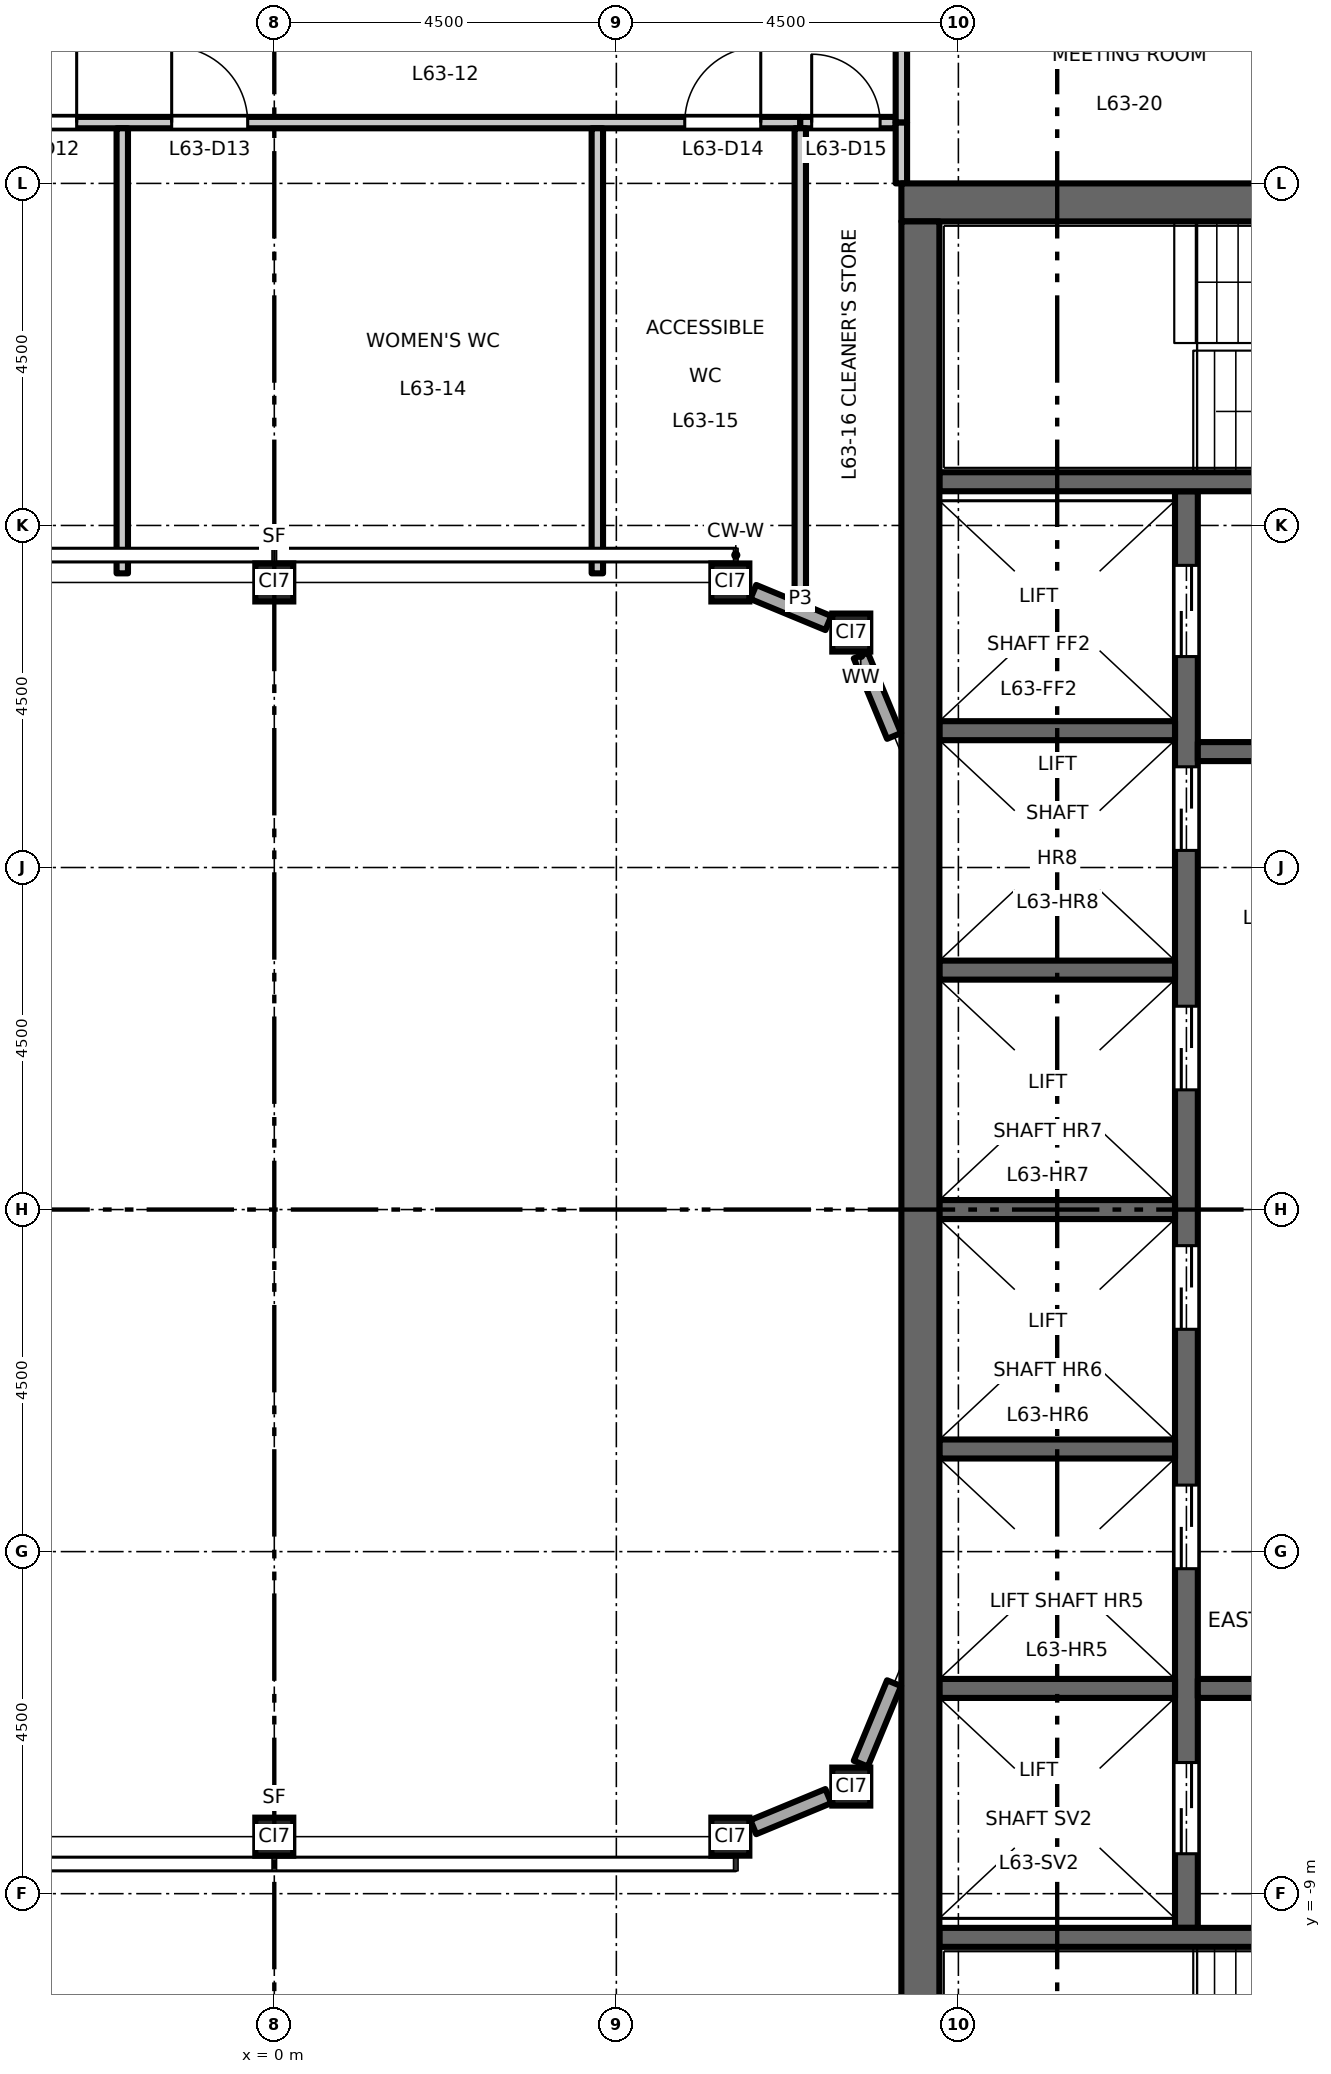
"""IFC4 building model, lengths in metres.
Left out: names, types, materials, properties, quantities, classifications, styles, units other than length and angle.
Written with IfcOpenShell. Run it as: python <this file> out.ifc"""

import sys

from ifc_helpers import new_model, si_unit, direction, frame, frame_2d, origin, origin_2d, place, context, subcontext, project, spatial, rectangle, hollow_rectangle, extrude, element, fill, save


model = new_model("IFC4")
c1 = context("Model", 3, precision=1e-05, world=origin(), true_north=direction((0.0, 1.0)))
c2 = subcontext(c1, "Body", "Model", "MODEL_VIEW")
j1 = project(units=[si_unit("LENGTHUNIT", "METRE"), si_unit("PLANEANGLEUNIT", "RADIAN")], contexts=[c1])
p1 = place(None, origin())
s1 = spatial("IfcSite", under=j1, at=p1, CompositionType="ELEMENT")
p2 = place(p1, origin())
s2 = spatial("IfcBuilding", under=s1, at=p2, CompositionType="ELEMENT")
p3 = place(p2, frame((0.0, 0.0, 294.2)))
s3 = spatial("IfcBuildingStorey", under=s2, at=p3, CompositionType="ELEMENT", Elevation=294.2)
for number, where, z_axis, x_axis in (
    (1, (0.0, -8.25, 0.0), (0.0, 0.0, 1.0), (1.0, 0.0, 0.0)),
    (2, (6.0, -8.25, 0.0), (0.0, 0.0, 1.0), (1.0, 0.0, 0.0)),
    (3, (7.591, -7.591, 0.0), (0.0, 0.0, 1.0), (1.0, 0.0, 0.0)),
    (4, (0.0, 8.25, 0.0), (0.0, 0.0, 1.0), (1.0, 0.0, 0.0)),
    (5, (6.0, 8.25, 0.0), (0.0, 0.0, 1.0), (1.0, 0.0, 0.0)),
    (6, (7.591, 7.591, 0.0), (0.0, 0.0, 1.0), (1.0, 0.0, 0.0)),
):
    element("IfcColumn", number, at=place(p3, frame(where, z_axis=z_axis, x_axis=x_axis)), inside=s3, PredefinedType="COLUMN", context=c2, shape_type="SweptSolid", body=[
        extrude(hollow_rectangle(XDim=0.5, YDim=0.5, WallThickness=0.025, at=origin_2d()), origin(), (0.0, 0.0, 1.0), 4.5),
    ])
p4 = place(p3, frame((12.0, -9.45, 0.0), z_axis=(0.0, 0.0, 1.0), x_axis=(0.0, 1.0, 0.0)))
e7 = element("IfcWall", 7, at=p4, inside=s3, PredefinedType="SHEAR", context=c2, shape_type="SweptSolid", body=[
    extrude(rectangle(XDim=18.9, YDim=0.3, at=frame_2d((9.45, 0.0))), origin(), (0.0, 0.0, 1.0), 4.35),
])
p5 = place(p4, frame((4.725, 0.0, 0.0)))
e8 = element("IfcOpeningElement", 8, at=p5, cuts=e7, PredefinedType="OPENING", context=c2, shape_type="SweptSolid", body=[
    extrude(rectangle(XDim=1.1, YDim=2.1, at=frame_2d((0.55, 1.05))), frame((0.0, 0.16, 0.0), z_axis=(0.0, -1.0, 0.0), x_axis=(1.0, 0.0, 0.0)), (0.0, 0.0, 1.0), 0.32),
])
p6 = place(p4, frame((7.875, 0.0, 0.0)))
e9 = element("IfcOpeningElement", 9, at=p6, cuts=e7, PredefinedType="OPENING", context=c2, shape_type="SweptSolid", body=[
    extrude(rectangle(XDim=1.1, YDim=2.1, at=frame_2d((0.55, 1.05))), frame((0.0, 0.16, 0.0), z_axis=(0.0, -1.0, 0.0), x_axis=(1.0, 0.0, 0.0)), (0.0, 0.0, 1.0), 0.32),
])
p7 = place(p4, frame((11.025, 0.0, 0.0)))
e10 = element("IfcOpeningElement", 10, at=p7, cuts=e7, PredefinedType="OPENING", context=c2, shape_type="SweptSolid", body=[
    extrude(rectangle(XDim=1.1, YDim=2.1, at=frame_2d((0.55, 1.05))), frame((0.0, 0.16, 0.0), z_axis=(0.0, -1.0, 0.0), x_axis=(1.0, 0.0, 0.0)), (0.0, 0.0, 1.0), 0.32),
])
p8 = place(p4, frame((14.175, 0.0, 0.0)))
e11 = element("IfcOpeningElement", 11, at=p8, cuts=e7, PredefinedType="OPENING", context=c2, shape_type="SweptSolid", body=[
    extrude(rectangle(XDim=1.1, YDim=2.1, at=frame_2d((0.55, 1.05))), frame((0.0, 0.16, 0.0), z_axis=(0.0, -1.0, 0.0), x_axis=(1.0, 0.0, 0.0)), (0.0, 0.0, 1.0), 0.32),
])
p9 = place(p4, frame((16.725, 0.0, 0.0)))
e12 = element("IfcOpeningElement", 12, at=p9, cuts=e7, PredefinedType="OPENING", context=c2, shape_type="SweptSolid", body=[
    extrude(rectangle(XDim=1.2, YDim=2.1, at=frame_2d((0.6, 1.05))), frame((0.0, 0.16, 0.0), z_axis=(0.0, -1.0, 0.0), x_axis=(1.0, 0.0, 0.0)), (0.0, 0.0, 1.0), 0.32),
])
p10 = place(p4, frame((0.975, 0.0, 0.0)))
e13 = element("IfcOpeningElement", 13, at=p10, cuts=e7, PredefinedType="OPENING", context=c2, shape_type="SweptSolid", body=[
    extrude(rectangle(XDim=1.2, YDim=2.1, at=frame_2d((0.6, 1.05))), frame((0.0, 0.16, 0.0), z_axis=(0.0, -1.0, 0.0), x_axis=(1.0, 0.0, 0.0)), (0.0, 0.0, 1.0), 0.32),
])
p11 = place(p3, frame((12.15, 6.025, 0.0), z_axis=(0.0, 0.0, 1.0), x_axis=(1.0, 0.0, 0.0)))
e14 = element("IfcWall", 14, at=p11, inside=s3, PredefinedType="SHEAR", context=c2, shape_type="SweptSolid", body=[
    extrude(rectangle(XDim=4.6, YDim=0.25, at=frame_2d((2.3, 0.0))), origin(), (0.0, 0.0, 1.0), 4.35),
])
p12 = place(p11, frame((1.8, 0.0, 0.0)))
e15 = element("IfcOpeningElement", 15, at=p12, cuts=e14, PredefinedType="OPENING", context=c2, shape_type="SweptSolid", body=[
    extrude(rectangle(XDim=1.0, YDim=2.1, at=frame_2d((0.5, 1.05))), frame((0.0, 0.135, 0.0), z_axis=(0.0, -1.0, 0.0), x_axis=(1.0, 0.0, 0.0)), (0.0, 0.0, 1.0), 0.27),
])
p13 = place(p3, frame((12.15, -6.3, 0.0), z_axis=(0.0, 0.0, 1.0), x_axis=(1.0, 0.0, 0.0)))
e16 = element("IfcWall", 16, at=p13, inside=s3, PredefinedType="SHEAR", context=c2, shape_type="SweptSolid", body=[
    extrude(rectangle(XDim=4.6, YDim=0.25, at=frame_2d((2.3, 0.0))), origin(), (0.0, 0.0, 1.0), 4.35),
])
p14 = place(p13, frame((1.8, 0.0, 0.0)))
e17 = element("IfcOpeningElement", 17, at=p14, cuts=e16, PredefinedType="OPENING", context=c2, shape_type="SweptSolid", body=[
    extrude(rectangle(XDim=1.0, YDim=2.1, at=frame_2d((0.5, 1.05))), frame((0.0, 0.135, 0.0), z_axis=(0.0, -1.0, 0.0), x_axis=(1.0, 0.0, 0.0)), (0.0, 0.0, 1.0), 0.27),
])
for number, where, z_axis, x_axis in (
    (18, (8.75, 0.0, 0.0), (0.0, 0.0, 1.0), (1.0, 0.0, 0.0)),
    (19, (8.75, 3.15, 0.0), (0.0, 0.0, 1.0), (1.0, 0.0, 0.0)),
    (20, (8.75, 6.3, 0.0), (0.0, 0.0, 1.0), (1.0, 0.0, 0.0)),
    (21, (8.75, -3.15, 0.0), (0.0, 0.0, 1.0), (1.0, 0.0, 0.0)),
    (22, (8.75, -6.3, 0.0), (0.0, 0.0, 1.0), (1.0, 0.0, 0.0)),
):
    element("IfcWall", number, at=place(p3, frame(where, z_axis=z_axis, x_axis=x_axis)), inside=s3, PredefinedType="SHEAR", context=c2, shape_type="SweptSolid", body=[
        extrude(rectangle(XDim=3.1, YDim=0.25, at=frame_2d((1.55, 0.0))), origin(), (0.0, 0.0, 1.0), 4.35),
    ])
p15 = place(p3, frame((8.75, 9.575, 0.0), z_axis=(0.0, 0.0, 1.0), x_axis=(1.0, 0.0, 0.0)))
e23 = element("IfcWall", 23, at=p15, inside=s3, PredefinedType="SHEAR", context=c2, shape_type="SweptSolid", body=[
    extrude(rectangle(XDim=8.0, YDim=0.25, at=frame_2d((4.0, 0.0))), origin(), (0.0, 0.0, 1.0), 4.35),
])
p16 = place(p15, frame((6.65, 0.0, 0.0)))
e24 = element("IfcOpeningElement", 24, at=p16, cuts=e23, PredefinedType="OPENING", context=c2, shape_type="SweptSolid", body=[
    extrude(rectangle(XDim=1.1, YDim=2.1, at=frame_2d((0.55, 1.05))), frame((0.0, 0.135, 0.0), z_axis=(0.0, -1.0, 0.0), x_axis=(1.0, 0.0, 0.0)), (0.0, 0.0, 1.0), 0.27),
])
p17 = place(p3, frame((8.75, -9.575, 0.0), z_axis=(0.0, 0.0, 1.0), x_axis=(1.0, 0.0, 0.0)))
e25 = element("IfcWall", 25, at=p17, inside=s3, PredefinedType="SHEAR", context=c2, shape_type="SweptSolid", body=[
    extrude(rectangle(XDim=8.0, YDim=0.25, at=frame_2d((4.0, 0.0))), origin(), (0.0, 0.0, 1.0), 4.35),
])
p18 = place(p17, frame((6.65, 0.0, 0.0)))
e26 = element("IfcOpeningElement", 26, at=p18, cuts=e25, PredefinedType="OPENING", context=c2, shape_type="SweptSolid", body=[
    extrude(rectangle(XDim=1.1, YDim=2.1, at=frame_2d((0.55, 1.05))), frame((0.0, 0.135, 0.0), z_axis=(0.0, -1.0, 0.0), x_axis=(1.0, 0.0, 0.0)), (0.0, 0.0, 1.0), 0.27),
])
p19 = place(p3, frame((8.25, 13.25, 0.0), z_axis=(0.0, 0.0, 1.0), x_axis=(1.0, 0.0, 0.0)))
e27 = element("IfcWall", 27, at=p19, inside=s3, PredefinedType="SHEAR", context=c2, shape_type="SweptSolid", body=[
    extrude(rectangle(XDim=9.0, YDim=0.5, at=frame_2d((4.5, 0.0))), origin(), (0.0, 0.0, 1.0), 4.35),
])
p20 = place(p3, frame((8.5, -13.0, 0.0), z_axis=(0.0, 0.0, 1.0), x_axis=(0.0, 1.0, 0.0)))
e28 = element("IfcWall", 28, at=p20, inside=s3, PredefinedType="SHEAR", context=c2, shape_type="SweptSolid", body=[
    extrude(rectangle(XDim=26.0, YDim=0.5, at=frame_2d((13.0, 0.0))), origin(), (0.0, 0.0, 1.0), 4.35),
])
p21 = place(p3, frame((6.302, -8.125, 0.0), z_axis=(0.0, 0.0, 1.0), x_axis=(0.923919409248, 0.382587147216, 0.0)))
e29 = element("IfcWall", 29, at=p21, inside=s3, PredefinedType="STANDARD", context=c2, shape_type="SweptSolid", body=[
    extrude(rectangle(XDim=1.069, YDim=0.2, at=frame_2d((0.534, 0.0))), origin(), (0.0, 0.0, 1.0), 4.01),
])
for number, where, z_axis, x_axis in (
    (30, (7.716, -7.289, 0.0), (0.0, 0.0, 1.0), (0.383, 0.924, 0.0)),
    (31, (8.154, 6.231, 0.0), (0.0, 0.0, 1.0), (-0.383, 0.924, 0.0)),
):
    element("IfcWall", number, at=place(p3, frame(where, z_axis=z_axis, x_axis=x_axis)), inside=s3, PredefinedType="STANDARD", context=c2, shape_type="SweptSolid", body=[
        extrude(rectangle(XDim=1.146, YDim=0.2, at=frame_2d((0.573, 0.0))), origin(), (0.0, 0.0, 1.0), 4.01),
    ])
p22 = place(p3, frame((7.289, 7.716, 0.0), z_axis=(0.0, 0.0, 1.0), x_axis=(-0.923919409248, 0.382587147216, 0.0)))
e32 = element("IfcWall", 32, at=p22, inside=s3, PredefinedType="STANDARD", context=c2, shape_type="SweptSolid", body=[
    extrude(rectangle(XDim=1.069, YDim=0.2, at=frame_2d((0.534, 0.0))), origin(), (0.0, 0.0, 1.0), 4.01),
])
p23 = place(p3, frame((-8.175, 14.3, 0.0), z_axis=(0.0, 0.0, 1.0), x_axis=(1.0, 0.0, 0.0)))
e33 = element("IfcWall", 33, at=p23, inside=s3, PredefinedType="PARTITIONING", context=c2, shape_type="SweptSolid", body=[
    extrude(rectangle(XDim=15.095, YDim=0.15, at=frame_2d((7.547, 0.0))), origin(), (0.0, 0.0, 1.0), 4.35),
])
p24 = place(p23, frame((4.575, 0.0, 0.0)))
e34 = element("IfcOpeningElement", 34, at=p24, cuts=e33, PredefinedType="OPENING", context=c2, shape_type="SweptSolid", body=[
    extrude(rectangle(XDim=1.0, YDim=2.1, at=frame_2d((0.5, 1.05))), frame((0.0, 0.085, 0.0), z_axis=(0.0, -1.0, 0.0), x_axis=(1.0, 0.0, 0.0)), (0.0, 0.0, 1.0), 0.17),
])
p25 = place(p23, frame((6.825, 0.0, 0.0)))
e35 = element("IfcOpeningElement", 35, at=p25, cuts=e33, PredefinedType="OPENING", context=c2, shape_type="SweptSolid", body=[
    extrude(rectangle(XDim=1.0, YDim=2.1, at=frame_2d((0.5, 1.05))), frame((0.0, 0.085, 0.0), z_axis=(0.0, -1.0, 0.0), x_axis=(1.0, 0.0, 0.0)), (0.0, 0.0, 1.0), 0.17),
])
p26 = place(p23, frame((13.575, 0.0, 0.0)))
e36 = element("IfcOpeningElement", 36, at=p26, cuts=e33, PredefinedType="OPENING", context=c2, shape_type="SweptSolid", body=[
    extrude(rectangle(XDim=1.0, YDim=2.1, at=frame_2d((0.5, 1.05))), frame((0.0, 0.085, 0.0), z_axis=(0.0, -1.0, 0.0), x_axis=(1.0, 0.0, 0.0)), (0.0, 0.0, 1.0), 0.17),
])
p27 = place(p3, frame((6.92, 14.3, 0.0), z_axis=(0.0, 0.0, 1.0), x_axis=(1.0, 0.0, 0.0)))
e37 = element("IfcWall", 37, at=p27, inside=s3, PredefinedType="PARTITIONING", context=c2, shape_type="SweptSolid", body=[
    extrude(rectangle(XDim=1.255, YDim=0.15, at=frame_2d((0.627, 0.0))), origin(), (0.0, 0.0, 1.0), 4.35),
])
p28 = place(p27, frame((0.15, 0.0, 0.0)))
e38 = element("IfcOpeningElement", 38, at=p28, cuts=e37, PredefinedType="OPENING", context=c2, shape_type="SweptSolid", body=[
    extrude(rectangle(XDim=0.9, YDim=2.1, at=frame_2d((0.45, 1.05))), frame((0.0, 0.085, 0.0), z_axis=(0.0, -1.0, 0.0), x_axis=(1.0, 0.0, 0.0)), (0.0, 0.0, 1.0), 0.17),
])
for number, where, z_axis, x_axis in (
    (39, (-2.0, 8.37, 0.0), (0.0, 0.0, 1.0), (0.0, 1.0, 0.0)),
    (40, (4.25, 8.37, 0.0), (0.0, 0.0, 1.0), (0.0, 1.0, 0.0)),
):
    element("IfcWall", number, at=place(p3, frame(where, z_axis=z_axis, x_axis=x_axis)), inside=s3, PredefinedType="PARTITIONING", context=c2, shape_type="SweptSolid", body=[
        extrude(rectangle(XDim=5.855, YDim=0.15, at=frame_2d((2.927, 0.0))), origin(), (0.0, 0.0, 1.0), 4.35),
    ])
p29 = place(p3, frame((6.92, 8.029, 0.0), z_axis=(0.0, 0.0, 1.0), x_axis=(0.0, 1.0, 0.0)))
e41 = element("IfcWall", 41, at=p29, inside=s3, PredefinedType="PARTITIONING", context=c2, shape_type="SweptSolid", body=[
    extrude(rectangle(XDim=6.196, YDim=0.15, at=frame_2d((3.098, 0.0))), origin(), (0.0, 0.0, 1.0), 4.35),
])
p30 = place(p3, frame((8.25, 14.3, 0.0), z_axis=(0.0, 0.0, 1.0), x_axis=(0.0, 1.0, 0.0)))
e42 = element("IfcWall", 42, at=p30, inside=s3, PredefinedType="PARTITIONING", context=c2, shape_type="SweptSolid", body=[
    extrude(rectangle(XDim=2.125, YDim=0.15, at=frame_2d((1.062, 0.0))), origin(), (0.0, 0.0, 1.0), 4.35),
])
p31 = place(p3, frame((8.25, 13.5, 0.0), z_axis=(0.0, 0.0, 1.0), x_axis=(0.0, 1.0, 0.0)))
e43 = element("IfcWall", 43, at=p31, inside=s3, PredefinedType="PARTITIONING", context=c2, shape_type="SweptSolid", body=[
    extrude(rectangle(XDim=0.8, YDim=0.15, at=frame_2d((0.4, 0.0))), origin(), (0.0, 0.0, 1.0), 4.35),
])
p32 = place(p5, origin())
e44 = element("IfcDoor", 44, at=p32, inside=s3, OperationType="DOUBLE_DOOR_SLIDING", PredefinedType="DOOR", context=c2, shape_type="SweptSolid", body=[
    extrude(rectangle(XDim=1.1, YDim=2.1, at=frame_2d((0.55, 1.05))), frame((0.0, 0.025, 0.0), z_axis=(0.0, -1.0, 0.0), x_axis=(1.0, 0.0, 0.0)), (0.0, 0.0, 1.0), 0.05),
])
fill(e8, e44)
p33 = place(p6, origin())
e45 = element("IfcDoor", 45, at=p33, inside=s3, OperationType="DOUBLE_DOOR_SLIDING", PredefinedType="DOOR", context=c2, shape_type="SweptSolid", body=[
    extrude(rectangle(XDim=1.1, YDim=2.1, at=frame_2d((0.55, 1.05))), frame((0.0, 0.025, 0.0), z_axis=(0.0, -1.0, 0.0), x_axis=(1.0, 0.0, 0.0)), (0.0, 0.0, 1.0), 0.05),
])
fill(e9, e45)
p34 = place(p7, origin())
e46 = element("IfcDoor", 46, at=p34, inside=s3, OperationType="DOUBLE_DOOR_SLIDING", PredefinedType="DOOR", context=c2, shape_type="SweptSolid", body=[
    extrude(rectangle(XDim=1.1, YDim=2.1, at=frame_2d((0.55, 1.05))), frame((0.0, 0.025, 0.0), z_axis=(0.0, -1.0, 0.0), x_axis=(1.0, 0.0, 0.0)), (0.0, 0.0, 1.0), 0.05),
])
fill(e10, e46)
p35 = place(p8, origin())
e47 = element("IfcDoor", 47, at=p35, inside=s3, OperationType="DOUBLE_DOOR_SLIDING", PredefinedType="DOOR", context=c2, shape_type="SweptSolid", body=[
    extrude(rectangle(XDim=1.1, YDim=2.1, at=frame_2d((0.55, 1.05))), frame((0.0, 0.025, 0.0), z_axis=(0.0, -1.0, 0.0), x_axis=(1.0, 0.0, 0.0)), (0.0, 0.0, 1.0), 0.05),
])
fill(e11, e47)
p36 = place(p9, origin())
e48 = element("IfcDoor", 48, at=p36, inside=s3, OperationType="DOUBLE_DOOR_SLIDING", PredefinedType="DOOR", context=c2, shape_type="SweptSolid", body=[
    extrude(rectangle(XDim=1.2, YDim=2.1, at=frame_2d((0.6, 1.05))), frame((0.0, 0.025, 0.0), z_axis=(0.0, -1.0, 0.0), x_axis=(1.0, 0.0, 0.0)), (0.0, 0.0, 1.0), 0.05),
])
fill(e12, e48)
p37 = place(p10, origin())
e49 = element("IfcDoor", 49, at=p37, inside=s3, OperationType="DOUBLE_DOOR_SLIDING", PredefinedType="DOOR", context=c2, shape_type="SweptSolid", body=[
    extrude(rectangle(XDim=1.2, YDim=2.1, at=frame_2d((0.6, 1.05))), frame((0.0, 0.025, 0.0), z_axis=(0.0, -1.0, 0.0), x_axis=(1.0, 0.0, 0.0)), (0.0, 0.0, 1.0), 0.05),
])
fill(e13, e49)
p38 = place(p24, origin())
e50 = element("IfcDoor", 50, at=p38, inside=s3, OperationType="SINGLE_SWING_RIGHT", PredefinedType="DOOR", context=c2, shape_type="SweptSolid", body=[
    extrude(rectangle(XDim=1.0, YDim=2.1, at=frame_2d((0.5, 1.05))), frame((0.0, 0.025, 0.0), z_axis=(0.0, -1.0, 0.0), x_axis=(1.0, 0.0, 0.0)), (0.0, 0.0, 1.0), 0.05),
])
fill(e34, e50)
p39 = place(p25, origin())
e51 = element("IfcDoor", 51, at=p39, inside=s3, OperationType="SINGLE_SWING_LEFT", PredefinedType="DOOR", context=c2, shape_type="SweptSolid", body=[
    extrude(rectangle(XDim=1.0, YDim=2.1, at=frame_2d((0.5, 1.05))), frame((0.0, 0.025, 0.0), z_axis=(0.0, -1.0, 0.0), x_axis=(1.0, 0.0, 0.0)), (0.0, 0.0, 1.0), 0.05),
])
fill(e35, e51)
p40 = place(p26, origin())
e52 = element("IfcDoor", 52, at=p40, inside=s3, OperationType="SINGLE_SWING_RIGHT", PredefinedType="DOOR", context=c2, shape_type="SweptSolid", body=[
    extrude(rectangle(XDim=1.0, YDim=2.1, at=frame_2d((0.5, 1.05))), frame((0.0, 0.025, 0.0), z_axis=(0.0, -1.0, 0.0), x_axis=(1.0, 0.0, 0.0)), (0.0, 0.0, 1.0), 0.05),
])
fill(e36, e52)
p41 = place(p28, origin())
e53 = element("IfcDoor", 53, at=p41, inside=s3, OperationType="SINGLE_SWING_LEFT", PredefinedType="DOOR", context=c2, shape_type="SweptSolid", body=[
    extrude(rectangle(XDim=0.9, YDim=2.1, at=frame_2d((0.45, 1.05))), frame((0.0, 0.025, 0.0), z_axis=(0.0, -1.0, 0.0), x_axis=(1.0, 0.0, 0.0)), (0.0, 0.0, 1.0), 0.05),
])
fill(e38, e53)
save(model, sys.argv[1])
